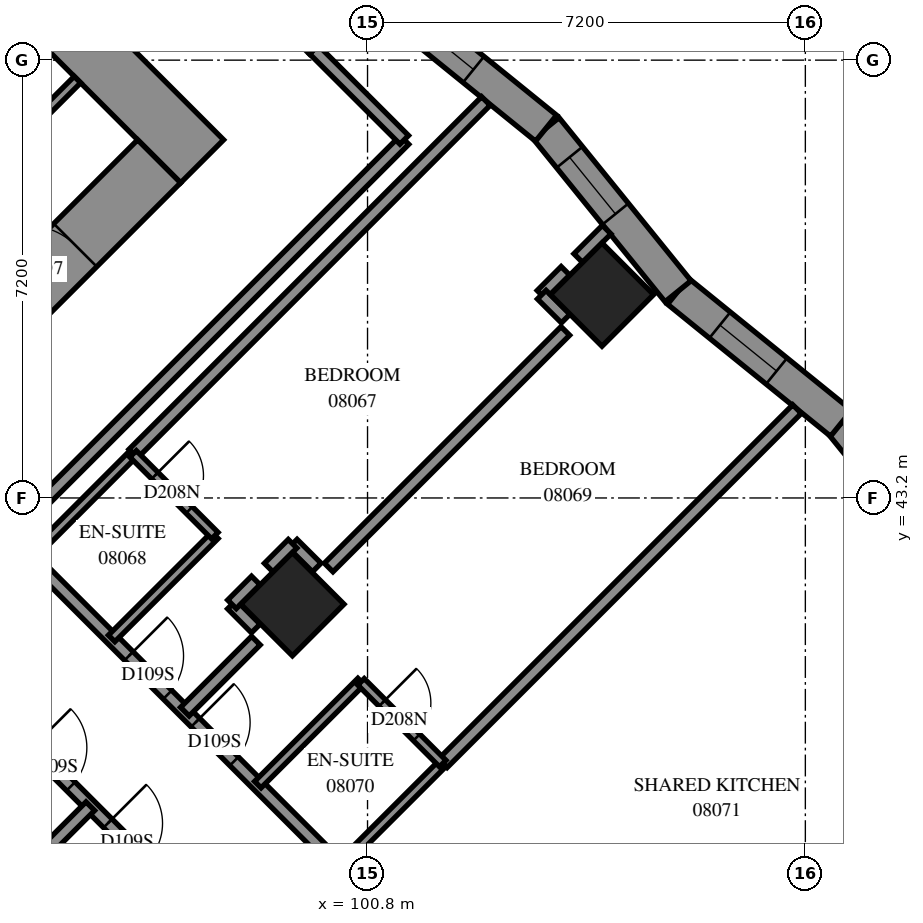
"""IFC4 building model, lengths in metres.
Left out: names, types, materials, properties, quantities, classifications, styles, units other than length and angle.
Written with IfcOpenShell. Run it as: python <this file> out.ifc"""

import sys

from ifc_helpers import new_model, si_unit, direction, frame, frame_2d, origin, origin_2d, place, context, subcontext, project, spatial, polyline, rectangle, outline, extrude, element, fill, save


model = new_model("IFC4")
c1 = context("Model", 3, precision=1e-05, world=origin(), true_north=direction((0.0, 1.0)))
c2 = subcontext(c1, "Body", "Model", "MODEL_VIEW")
j1 = project(units=[si_unit("LENGTHUNIT", "METRE"), si_unit("PLANEANGLEUNIT", "RADIAN")], contexts=[c1])
p1 = place(None, origin())
s1 = spatial("IfcSite", under=j1, at=p1, CompositionType="ELEMENT")
p2 = place(p1, origin())
s2 = spatial("IfcBuilding", under=s1, at=p2, CompositionType="ELEMENT")
p3 = place(p2, frame((0.0, 0.0, 33.8)))
s3 = spatial("IfcBuildingStorey", under=s2, at=p3, CompositionType="ELEMENT", Elevation=33.8)
for number, where, z_axis, x_axis in (
    (1, (104.656, 46.544, 0.0), (0.0, 0.0, 1.0), (0.707, -0.707, 0.0)),
    (2, (99.565, 41.453, 0.0), (0.0, 0.0, 1.0), (0.707, -0.707, 0.0)),
):
    element("IfcColumn", number, at=place(p3, frame(where, z_axis=z_axis, x_axis=x_axis)), inside=s3, PredefinedType="COLUMN", context=c2, shape_type="SweptSolid", body=[
        extrude(rectangle(XDim=1.2, YDim=1.2, at=origin_2d()), origin(), (0.0, 0.0, 1.0), 3.1),
    ])
p4 = place(p3, frame((86.483, 60.333, -0.3), z_axis=(0.0, 0.0, 1.0), x_axis=(0.70710983, -0.7071037324, 0.0)))
e3 = element("IfcWall", 3, at=p4, inside=s3, PredefinedType="SHEAR", context=c2, shape_type="SweptSolid", body=[
    extrude(rectangle(XDim=16.4, YDim=1.0, at=frame_2d((8.2, 0.0))), origin(), (0.0, 0.0, 1.0), 2.7),
])
p5 = place(p4, frame((11.0, 0.0, 0.3)))
e4 = element("IfcOpeningElement", 4, at=p5, cuts=e3, PredefinedType="OPENING", context=c2, shape_type="SweptSolid", body=[
    extrude(rectangle(XDim=0.8, YDim=2.1, at=frame_2d((0.4, 1.05))), frame((0.0, 0.51, 0.0), z_axis=(0.0, -1.0, 0.0), x_axis=(1.0, 0.0, 0.0)), (0.0, 0.0, 1.0), 1.02),
])
p6 = place(p3, frame((87.19, 38.554, -0.3), z_axis=(0.0, 0.0, 1.0), x_axis=(0.707103309, 0.7071102534, 0.0)))
e5 = element("IfcWall", 5, at=p6, inside=s3, PredefinedType="SHEAR", context=c2, shape_type="SweptSolid", body=[
    extrude(rectangle(XDim=14.4, YDim=1.0, at=frame_2d((7.2, 0.0))), origin(), (0.0, 0.0, 1.0), 2.7),
])
p7 = place(p6, frame((4.55, 0.0, 0.3)))
e6 = element("IfcOpeningElement", 6, at=p7, cuts=e5, PredefinedType="OPENING", context=c2, shape_type="SweptSolid", body=[
    extrude(rectangle(XDim=1.1, YDim=2.1, at=frame_2d((0.55, 1.05))), frame((0.0, 0.51, 0.0), z_axis=(0.0, -1.0, 0.0), x_axis=(1.0, 0.0, 0.0)), (0.0, 0.0, 1.0), 1.02),
])
p8 = place(p6, frame((11.35, 0.0, 0.3)))
e7 = element("IfcOpeningElement", 7, at=p8, cuts=e5, PredefinedType="OPENING", context=c2, shape_type="SweptSolid", body=[
    extrude(rectangle(XDim=1.1, YDim=2.1, at=frame_2d((0.55, 1.05))), frame((0.0, 0.51, 0.0), z_axis=(0.0, -1.0, 0.0), x_axis=(1.0, 0.0, 0.0)), (0.0, 0.0, 1.0), 1.02),
])
p9 = place(p3, frame((110.759, 41.747, 0.0), z_axis=(0.0, 0.0, 1.0), x_axis=(-0.6292199091, 0.7772273194, 0.0)))
e8 = element("IfcWall", 8, at=p9, inside=s3, PredefinedType="SOLIDWALL", context=c2, shape_type="SweptSolid", body=[
    extrude(outline(polyline([(0.029, -0.275), (3.479, -0.275), (3.421, 0.275), (-0.029, 0.275), (0.029, -0.275)])), origin(), (0.0, 0.0, 1.0), 3.1),
])
p10 = place(p9, frame((1.265, 0.0, 0.5)))
e9 = element("IfcOpeningElement", 9, at=p10, cuts=e8, PredefinedType="OPENING", context=c2, shape_type="SweptSolid", body=[
    extrude(rectangle(XDim=1.2, YDim=2.45, at=frame_2d((0.6, 1.225))), frame((0.0, 0.285, 0.0), z_axis=(0.0, -1.0, 0.0), x_axis=(1.0, 0.0, 0.0)), (0.0, 0.0, 1.0), 0.57),
])
p11 = place(p3, frame((108.588, 44.429, 0.0), z_axis=(0.0, 0.0, 1.0), x_axis=(-0.7772131435, 0.6292374191, 0.0)))
e10 = element("IfcWall", 10, at=p11, inside=s3, PredefinedType="SOLIDWALL", context=c2, shape_type="SweptSolid", body=[
    extrude(outline(polyline([(-0.029, -0.275), (3.421, -0.275), (3.479, 0.275), (0.029, 0.275), (-0.029, -0.275)])), origin(), (0.0, 0.0, 1.0), 3.1),
])
p12 = place(p11, frame((1.365, 0.0, 0.5)))
e11 = element("IfcOpeningElement", 11, at=p12, cuts=e10, PredefinedType="OPENING", context=c2, shape_type="SweptSolid", body=[
    extrude(rectangle(XDim=1.2, YDim=2.45, at=frame_2d((0.6, 1.225))), frame((0.0, 0.285, 0.0), z_axis=(0.0, -1.0, 0.0), x_axis=(1.0, 0.0, 0.0)), (0.0, 0.0, 1.0), 0.57),
])
p13 = place(p3, frame((105.907, 46.599, 0.0), z_axis=(0.0, 0.0, 1.0), x_axis=(-0.6292374191, 0.7772131435, 0.0)))
e12 = element("IfcWall", 12, at=p13, inside=s3, PredefinedType="SOLIDWALL", context=c2, shape_type="SweptSolid", body=[
    extrude(outline(polyline([(0.029, -0.275), (3.479, -0.275), (3.421, 0.275), (-0.029, 0.275), (0.029, -0.275)])), origin(), (0.0, 0.0, 1.0), 3.1),
])
p14 = place(p13, frame((1.635, 0.0, 0.5)))
e13 = element("IfcOpeningElement", 13, at=p14, cuts=e12, PredefinedType="OPENING", context=c2, shape_type="SweptSolid", body=[
    extrude(rectangle(XDim=1.2, YDim=2.45, at=frame_2d((0.6, 1.225))), frame((0.0, 0.285, 0.0), z_axis=(0.0, -1.0, 0.0), x_axis=(1.0, 0.0, 0.0)), (0.0, 0.0, 1.0), 0.57),
])
p15 = place(p3, frame((103.736, 49.281, 0.0), z_axis=(0.0, 0.0, 1.0), x_axis=(-0.7772131435, 0.6292374191, 0.0)))
e14 = element("IfcWall", 14, at=p15, inside=s3, PredefinedType="SOLIDWALL", context=c2, shape_type="SweptSolid", body=[
    extrude(outline(polyline([(-0.029, -0.275), (3.421, -0.275), (3.479, 0.275), (0.029, 0.275), (-0.029, -0.275)])), origin(), (0.0, 0.0, 1.0), 3.1),
])
p16 = place(p15, frame((1.535, 0.0, 0.5)))
e15 = element("IfcOpeningElement", 15, at=p16, cuts=e14, PredefinedType="OPENING", context=c2, shape_type="SweptSolid", body=[
    extrude(rectangle(XDim=1.2, YDim=2.45, at=frame_2d((0.6, 1.225))), frame((0.0, 0.285, 0.0), z_axis=(0.0, -1.0, 0.0), x_axis=(1.0, 0.0, 0.0)), (0.0, 0.0, 1.0), 0.57),
])
p17 = place(p3, frame((95.308, 49.358, 0.0), z_axis=(0.0, 0.0, 1.0), x_axis=(0.70705776, 0.707155799, 0.0)))
e16 = element("IfcWall", 16, at=p17, inside=s3, PredefinedType="PARTITIONING", context=c2, shape_type="SweptSolid", body=[
    extrude(rectangle(XDim=1.02, YDim=0.15, at=frame_2d((0.51, 0.0))), origin(), (0.0, 0.0, 1.0), 3.1),
])
p18 = place(p3, frame((94.895, 42.581, 0.0), z_axis=(0.0, 0.0, 1.0), x_axis=(0.7071067812, -0.7071067812, 0.0)))
e17 = element("IfcWall", 17, at=p18, inside=s3, PredefinedType="PARTITIONING", context=c2, shape_type="SweptSolid", body=[
    extrude(rectangle(XDim=14.9, YDim=0.2, at=frame_2d((7.45, 0.0))), origin(), (0.0, 0.0, 1.0), 3.1),
])
p19 = place(p18, frame((2.8, 0.0, 0.0)))
e18 = element("IfcOpeningElement", 18, at=p19, cuts=e17, PredefinedType="OPENING", context=c2, shape_type="SweptSolid", body=[
    extrude(rectangle(XDim=0.9, YDim=2.1, at=frame_2d((0.45, 1.05))), frame((0.0, 0.11, 0.0), z_axis=(0.0, -1.0, 0.0), x_axis=(1.0, 0.0, 0.0)), (0.0, 0.0, 1.0), 0.22),
])
p20 = place(p18, frame((4.348, 0.0, 0.0)))
e19 = element("IfcOpeningElement", 19, at=p20, cuts=e17, PredefinedType="OPENING", context=c2, shape_type="SweptSolid", body=[
    extrude(rectangle(XDim=0.9, YDim=2.1, at=frame_2d((0.45, 1.05))), frame((0.0, 0.11, 0.0), z_axis=(0.0, -1.0, 0.0), x_axis=(1.0, 0.0, 0.0)), (0.0, 0.0, 1.0), 0.22),
])
p21 = place(p18, frame((10.073, 0.0, 0.0)))
e20 = element("IfcOpeningElement", 20, at=p21, cuts=e17, PredefinedType="OPENING", context=c2, shape_type="SweptSolid", body=[
    extrude(rectangle(XDim=1.0, YDim=2.1, at=frame_2d((0.5, 1.05))), frame((0.0, 0.11, 0.0), z_axis=(0.0, -1.0, 0.0), x_axis=(1.0, 0.0, 0.0)), (0.0, 0.0, 1.0), 0.22),
])
p22 = place(p3, frame((105.437, 32.045, 0.0), z_axis=(0.0, 0.0, 1.0), x_axis=(0.70701308, 0.70720047, 0.0)))
e21 = element("IfcWall", 21, at=p22, inside=s3, PredefinedType="PARTITIONING", context=c2, shape_type="SweptSolid", body=[
    extrude(rectangle(XDim=10.673, YDim=0.2, at=frame_2d((5.337, 0.0))), origin(), (0.0, 0.0, 1.0), 3.1),
])
p23 = place(p3, frame((94.901, 42.583, 0.0), z_axis=(0.0, 0.0, 1.0), x_axis=(0.7072154749, 0.7069980708, 0.0)))
e22 = element("IfcWall", 22, at=p23, inside=s3, PredefinedType="PARTITIONING", context=c2, shape_type="SweptSolid", body=[
    extrude(rectangle(XDim=9.2, YDim=0.2, at=frame_2d((4.6, 0.0))), origin(), (0.0, 0.0, 1.0), 3.1),
])
p24 = place(p3, frame((102.039, 38.837, 0.0), z_axis=(0.0, 0.0, 1.0), x_axis=(0.7071067812, 0.7071067812, 0.0)))
e23 = element("IfcWall", 23, at=p24, inside=s3, PredefinedType="PARTITIONING", context=c2, shape_type="SweptSolid", body=[
    extrude(rectangle(XDim=8.237, YDim=0.2, at=frame_2d((4.119, 0.0))), origin(), (0.0, 0.0, 1.0), 3.1),
])
p25 = place(p3, frame((96.947, 43.929, 0.0), z_axis=(0.0, 0.0, 1.0), x_axis=(0.7071067812, 0.7071067812, 0.0)))
e24 = element("IfcWall", 24, at=p25, inside=s3, PredefinedType="PARTITIONING", context=c2, shape_type="SweptSolid", body=[
    extrude(rectangle(XDim=8.201, YDim=0.2, at=frame_2d((4.101, 0.0))), origin(), (0.0, 0.0, 1.0), 3.1),
])
p26 = place(p3, frame((100.161, 42.057, 0.0), z_axis=(0.0, 0.0, 1.0), x_axis=(0.7072884866, 0.706925029, 0.0)))
e25 = element("IfcWall", 25, at=p26, inside=s3, PredefinedType="PARTITIONING", context=c2, shape_type="SweptSolid", body=[
    extrude(rectangle(XDim=5.503, YDim=0.2, at=frame_2d((2.751, 0.0))), origin(), (0.0, 0.0, 1.0), 3.1),
])
p27 = place(p3, frame((93.699, 40.679, 0.0), z_axis=(0.0, 0.0, 1.0), x_axis=(0.7071067812, -0.7071067812, 0.0)))
e26 = element("IfcWall", 26, at=p27, inside=s3, PredefinedType="PARTITIONING", context=c2, shape_type="SweptSolid", body=[
    extrude(rectangle(XDim=5.301, YDim=0.2, at=frame_2d((2.65, 0.0))), origin(), (0.0, 0.0, 1.0), 3.1),
])
p28 = place(p27, frame((2.242, 0.0, 0.0)))
e27 = element("IfcOpeningElement", 27, at=p28, cuts=e26, PredefinedType="OPENING", context=c2, shape_type="SweptSolid", body=[
    extrude(rectangle(XDim=0.9, YDim=2.1, at=frame_2d((0.45, 1.05))), frame((0.0, 0.11, 0.0), z_axis=(0.0, -1.0, 0.0), x_axis=(1.0, 0.0, 0.0)), (0.0, 0.0, 1.0), 0.22),
])
p29 = place(p27, frame((4.002, 0.0, 0.0)))
e28 = element("IfcOpeningElement", 28, at=p29, cuts=e26, PredefinedType="OPENING", context=c2, shape_type="SweptSolid", body=[
    extrude(rectangle(XDim=0.9, YDim=2.1, at=frame_2d((0.45, 1.05))), frame((0.0, 0.11, 0.0), z_axis=(0.0, -1.0, 0.0), x_axis=(1.0, 0.0, 0.0)), (0.0, 0.0, 1.0), 0.22),
])
for number, where, z_axis, x_axis in (
    (29, (100.34, 37.142, 0.0), (0.0, 0.0, 1.0), (0.708, 0.707, 0.0)),
    (30, (96.592, 40.89, 0.0), (0.0, 0.0, 1.0), (0.708, 0.707, 0.0)),
    (31, (98.996, 38.486, 0.0), (0.0, 0.0, 1.0), (0.708, 0.707, 0.0)),
    (32, (95.252, 42.23, 0.0), (0.0, 0.0, 1.0), (0.707, 0.708, 0.0)),
):
    element("IfcWall", number, at=place(p3, frame(where, z_axis=z_axis, x_axis=x_axis)), inside=s3, PredefinedType="PARTITIONING", context=c2, shape_type="SweptSolid", body=[
        extrude(rectangle(XDim=2.4, YDim=0.15, at=frame_2d((1.2, 0.0))), origin(), (0.0, 0.0, 1.0), 3.1),
    ])
p30 = place(p3, frame((99.918, 50.574, 0.0), z_axis=(0.0, 0.0, 1.0), x_axis=(0.7075827869, -0.7066304548, 0.0)))
e33 = element("IfcWall", 33, at=p30, inside=s3, PredefinedType="PARTITIONING", context=c2, shape_type="SweptSolid", body=[
    extrude(rectangle(XDim=2.1, YDim=0.2, at=frame_2d((1.05, 0.0))), origin(), (0.0, 0.0, 1.0), 3.1),
])
p31 = place(p3, frame((96.945, 43.925, 0.0), z_axis=(0.0, 0.0, 1.0), x_axis=(0.7071067812, -0.7071067812, 0.0)))
e34 = element("IfcWall", 34, at=p31, inside=s3, PredefinedType="PARTITIONING", context=c2, shape_type="SweptSolid", body=[
    extrude(rectangle(XDim=1.901, YDim=0.15, at=frame_2d((0.95, 0.0))), origin(), (0.0, 0.0, 1.0), 3.1),
])
p32 = place(p31, frame((0.505, 0.0, 0.0)))
e35 = element("IfcOpeningElement", 35, at=p32, cuts=e34, PredefinedType="OPENING", context=c2, shape_type="SweptSolid", body=[
    extrude(rectangle(XDim=0.8, YDim=2.1, at=frame_2d((0.4, 1.05))), frame((0.0, 0.085, 0.0), z_axis=(0.0, -1.0, 0.0), x_axis=(1.0, 0.0, 0.0)), (0.0, 0.0, 1.0), 0.17),
])
p33 = place(p3, frame((100.693, 40.177, 0.0), z_axis=(0.0, 0.0, 1.0), x_axis=(0.7071067812, -0.7071067812, 0.0)))
e36 = element("IfcWall", 36, at=p33, inside=s3, PredefinedType="PARTITIONING", context=c2, shape_type="SweptSolid", body=[
    extrude(rectangle(XDim=1.901, YDim=0.15, at=frame_2d((0.95, 0.0))), origin(), (0.0, 0.0, 1.0), 3.1),
])
p34 = place(p33, frame((0.493, 0.0, 0.0)))
e37 = element("IfcOpeningElement", 37, at=p34, cuts=e36, PredefinedType="OPENING", context=c2, shape_type="SweptSolid", body=[
    extrude(rectangle(XDim=0.8, YDim=2.1, at=frame_2d((0.4, 1.05))), frame((0.0, 0.085, 0.0), z_axis=(0.0, -1.0, 0.0), x_axis=(1.0, 0.0, 0.0)), (0.0, 0.0, 1.0), 0.17),
])
for number, where, z_axis, x_axis in (
    (38, (97.796, 39.686, 0.0), (0.0, 0.0, 1.0), (0.707, 0.707, 0.0)),
    (39, (95.073, 36.963, 0.0), (0.0, 0.0, 1.0), (0.707, 0.707, 0.0)),
):
    element("IfcWall", number, at=place(p3, frame(where, z_axis=z_axis, x_axis=x_axis)), inside=s3, PredefinedType="PARTITIONING", context=c2, shape_type="SweptSolid", body=[
        extrude(rectangle(XDim=1.652, YDim=0.2, at=frame_2d((0.826, 0.0))), origin(), (0.0, 0.0, 1.0), 3.1),
    ])
p35 = place(p3, frame((99.453, 51.033, 0.0), z_axis=(0.0, 0.0, 1.0), x_axis=(0.7071067812, -0.7071067812, 0.0)))
e40 = element("IfcWall", 40, at=p35, inside=s3, PredefinedType="PARTITIONING", context=c2, shape_type="SweptSolid", body=[
    extrude(rectangle(XDim=0.653, YDim=0.2, at=frame_2d((0.327, 0.0))), origin(), (0.0, 0.0, 1.0), 3.1),
])
p36 = place(p3, frame((104.265, 47.145, 0.0), z_axis=(0.0, 0.0, 1.0), x_axis=(0.7071823954, 0.7070311588, 0.0)))
e41 = element("IfcWall", 41, at=p36, inside=s3, PredefinedType="PARTITIONING", context=c2, shape_type="SweptSolid", body=[
    extrude(rectangle(XDim=0.661, YDim=0.2, at=frame_2d((0.331, 0.0))), origin(), (0.0, 0.0, 1.0), 3.1),
])
p37 = place(p3, frame((103.661, 46.541, 0.0), z_axis=(0.0, 0.0, 1.0), x_axis=(0.7071067812, 0.7071067812, 0.0)))
e42 = element("IfcWall", 42, at=p37, inside=s3, PredefinedType="PARTITIONING", context=c2, shape_type="SweptSolid", body=[
    extrude(rectangle(XDim=0.557, YDim=0.2, at=frame_2d((0.279, 0.0))), origin(), (0.0, 0.0, 1.0), 3.1),
])
for number, where, z_axis, x_axis in (
    (43, (98.57, 41.448, 0.0), (0.0, 0.0, 1.0), (0.705, -0.709, 0.0)),
    (44, (99.571, 42.449, 0.0), (0.0, 0.0, 1.0), (0.709, -0.705, 0.0)),
    (45, (103.665, 46.543, 0.0), (0.0, 0.0, 1.0), (0.709, -0.705, 0.0)),
):
    element("IfcWall", number, at=place(p3, frame(where, z_axis=z_axis, x_axis=x_axis)), inside=s3, PredefinedType="PARTITIONING", context=c2, shape_type="SweptSolid", body=[
        extrude(rectangle(XDim=0.556, YDim=0.2, at=frame_2d((0.278, 0.0))), origin(), (0.0, 0.0, 1.0), 3.1),
    ])
for number, where, z_axis, x_axis in (
    (46, (98.571, 41.451, 0.0), (0.0, 0.0, 1.0), (0.707, 0.707, 0.0)),
    (47, (99.175, 42.055, 0.0), (0.0, 0.0, 1.0), (0.707, 0.707, 0.0)),
):
    element("IfcWall", number, at=place(p3, frame(where, z_axis=z_axis, x_axis=x_axis)), inside=s3, PredefinedType="PARTITIONING", context=c2, shape_type="SweptSolid", body=[
        extrude(rectangle(XDim=0.554, YDim=0.2, at=frame_2d((0.277, 0.0))), origin(), (0.0, 0.0, 1.0), 3.1),
    ])
p38 = place(p12, origin())
e48 = element("IfcWindow", 48, at=p38, inside=s3, PartitioningType="SINGLE_PANEL", PredefinedType="WINDOW", context=c2, shape_type="SweptSolid", body=[
    extrude(rectangle(XDim=1.2, YDim=2.45, at=frame_2d((0.6, 1.225))), frame((0.0, 0.155, 0.0), z_axis=(0.0, -1.0, 0.0), x_axis=(1.0, 0.0, 0.0)), (0.0, 0.0, 1.0), 0.06),
])
fill(e11, e48)
p39 = place(p14, origin())
e49 = element("IfcWindow", 49, at=p39, inside=s3, PartitioningType="SINGLE_PANEL", PredefinedType="WINDOW", context=c2, shape_type="SweptSolid", body=[
    extrude(rectangle(XDim=1.2, YDim=2.45, at=frame_2d((0.6, 1.225))), frame((0.0, 0.155, 0.0), z_axis=(0.0, -1.0, 0.0), x_axis=(1.0, 0.0, 0.0)), (0.0, 0.0, 1.0), 0.06),
])
fill(e13, e49)
p40 = place(p16, origin())
e50 = element("IfcWindow", 50, at=p40, inside=s3, PartitioningType="SINGLE_PANEL", PredefinedType="WINDOW", context=c2, shape_type="SweptSolid", body=[
    extrude(rectangle(XDim=1.2, YDim=2.45, at=frame_2d((0.6, 1.225))), frame((0.0, 0.155, 0.0), z_axis=(0.0, -1.0, 0.0), x_axis=(1.0, 0.0, 0.0)), (0.0, 0.0, 1.0), 0.06),
])
fill(e15, e50)
p41 = place(p8, origin())
e51 = element("IfcDoor", 51, at=p41, inside=s3, OperationType="SINGLE_SWING_RIGHT", PredefinedType="DOOR", context=c2, shape_type="SweptSolid", body=[
    extrude(rectangle(XDim=1.1, YDim=2.1, at=frame_2d((0.55, 1.05))), frame((0.0, 0.025, 0.0), z_axis=(0.0, -1.0, 0.0), x_axis=(1.0, 0.0, 0.0)), (0.0, 0.0, 1.0), 0.05),
])
fill(e7, e51)
p42 = place(p19, origin())
e52 = element("IfcDoor", 52, at=p42, inside=s3, OperationType="SINGLE_SWING_RIGHT", PredefinedType="DOOR", context=c2, shape_type="SweptSolid", body=[
    extrude(rectangle(XDim=0.9, YDim=2.1, at=frame_2d((0.45, 1.05))), frame((0.0, 0.025, 0.0), z_axis=(0.0, -1.0, 0.0), x_axis=(1.0, 0.0, 0.0)), (0.0, 0.0, 1.0), 0.05),
])
fill(e18, e52)
p43 = place(p32, origin())
e53 = element("IfcDoor", 53, at=p43, inside=s3, OperationType="SINGLE_SWING_RIGHT", PredefinedType="DOOR", context=c2, shape_type="SweptSolid", body=[
    extrude(rectangle(XDim=0.8, YDim=2.1, at=frame_2d((0.4, 1.05))), frame((0.0, 0.025, 0.0), z_axis=(0.0, -1.0, 0.0), x_axis=(1.0, 0.0, 0.0)), (0.0, 0.0, 1.0), 0.05),
])
fill(e35, e53)
p44 = place(p20, origin())
e54 = element("IfcDoor", 54, at=p44, inside=s3, OperationType="SINGLE_SWING_LEFT", PredefinedType="DOOR", context=c2, shape_type="SweptSolid", body=[
    extrude(rectangle(XDim=0.9, YDim=2.1, at=frame_2d((0.45, 1.05))), frame((0.0, 0.025, 0.0), z_axis=(0.0, -1.0, 0.0), x_axis=(1.0, 0.0, 0.0)), (0.0, 0.0, 1.0), 0.05),
])
fill(e19, e54)
p45 = place(p34, origin())
e55 = element("IfcDoor", 55, at=p45, inside=s3, OperationType="SINGLE_SWING_RIGHT", PredefinedType="DOOR", context=c2, shape_type="SweptSolid", body=[
    extrude(rectangle(XDim=0.8, YDim=2.1, at=frame_2d((0.4, 1.05))), frame((0.0, 0.025, 0.0), z_axis=(0.0, -1.0, 0.0), x_axis=(1.0, 0.0, 0.0)), (0.0, 0.0, 1.0), 0.05),
])
fill(e37, e55)
p46 = place(p28, origin())
e56 = element("IfcDoor", 56, at=p46, inside=s3, OperationType="SINGLE_SWING_LEFT", PredefinedType="DOOR", context=c2, shape_type="SweptSolid", body=[
    extrude(rectangle(XDim=0.9, YDim=2.1, at=frame_2d((0.45, 1.05))), frame((0.0, 0.025, 0.0), z_axis=(0.0, -1.0, 0.0), x_axis=(1.0, 0.0, 0.0)), (0.0, 0.0, 1.0), 0.05),
])
fill(e27, e56)
p47 = place(p29, origin())
e57 = element("IfcDoor", 57, at=p47, inside=s3, OperationType="SINGLE_SWING_RIGHT", PredefinedType="DOOR", context=c2, shape_type="SweptSolid", body=[
    extrude(rectangle(XDim=0.9, YDim=2.1, at=frame_2d((0.45, 1.05))), frame((0.0, 0.025, 0.0), z_axis=(0.0, -1.0, 0.0), x_axis=(1.0, 0.0, 0.0)), (0.0, 0.0, 1.0), 0.05),
])
fill(e28, e57)
save(model, sys.argv[1])
